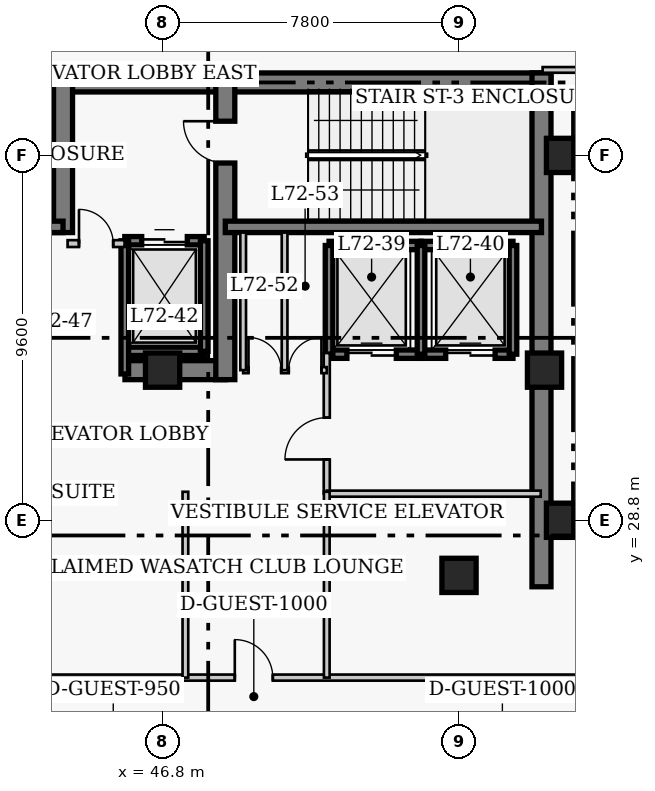
"""IFC4 building model, lengths in metres.
Left out: names, types, materials, properties, quantities, classifications, styles, units other than length and angle.
Written with IfcOpenShell. Run it as: python <this file> out.ifc"""

import sys

from ifc_helpers import new_model, si_unit, direction, frame, frame_2d, origin, origin_2d, place, context, subcontext, project, spatial, rectangle, extrude, element, fill, save


model = new_model("IFC4")
c1 = context("Model", 3, precision=1e-05, world=origin(), true_north=direction((0.0, 1.0)))
c2 = subcontext(c1, "Body", "Model", "MODEL_VIEW")
j1 = project(units=[si_unit("LENGTHUNIT", "METRE"), si_unit("PLANEANGLEUNIT", "RADIAN")], contexts=[c1])
p1 = place(None, origin())
s1 = spatial("IfcSite", under=j1, at=p1, CompositionType="ELEMENT")
p2 = place(p1, origin())
s2 = spatial("IfcBuilding", under=s1, at=p2, CompositionType="ELEMENT")
p3 = place(p2, frame((0.0, 0.0, 289.4)))
s3 = spatial("IfcBuildingStorey", under=s2, at=p3, CompositionType="ELEMENT", Elevation=289.4)
p4 = place(p3, frame((35.85, 40.32, 0.0), z_axis=(0.0, 0.0, 1.0), x_axis=(1.0, 0.0, 0.0)))
e1 = element("IfcWall", 1, at=p4, inside=s3, PredefinedType="SHEAR", context=c2, shape_type="SweptSolid", body=[
    extrude(rectangle(XDim=12.6, YDim=0.5, at=frame_2d((6.3, 0.0))), origin(), (0.0, 0.0, 1.0), 4.0),
])
p5 = place(p3, frame((48.45, 40.32, 0.0), z_axis=(0.0, 0.0, 1.0), x_axis=(1.0, 0.0, 0.0)))
e2 = element("IfcWall", 2, at=p5, inside=s3, PredefinedType="SHEAR", context=c2, shape_type="SweptSolid", body=[
    extrude(rectangle(XDim=8.57, YDim=0.5, at=frame_2d((4.285, 0.0))), origin(), (0.0, 0.0, 1.0), 4.0),
])
p6 = place(p3, frame((56.77, 27.05, 0.0), z_axis=(0.0, 0.0, 1.0), x_axis=(0.0, 1.0, 0.0)))
e3 = element("IfcWall", 3, at=p6, inside=s3, PredefinedType="SHEAR", context=c2, shape_type="SweptSolid", body=[
    extrude(rectangle(XDim=13.52, YDim=0.5, at=frame_2d((6.76, 0.0))), origin(), (0.0, 0.0, 1.0), 4.0),
])
p7 = place(p3, frame((45.81, 32.75, 0.0), z_axis=(0.0, 0.0, 1.0), x_axis=(1.0, 0.0, 0.0)))
e4 = element("IfcWall", 4, at=p7, inside=s3, PredefinedType="SHEAR", context=c2, shape_type="SweptSolid", body=[
    extrude(rectangle(XDim=2.64, YDim=0.5, at=frame_2d((1.32, 0.0))), origin(), (0.0, 0.0, 1.0), 4.0),
])
p8 = place(p3, frame((44.18, 36.37, 0.0), z_axis=(0.0, 0.0, 1.0), x_axis=(0.0, 1.0, 0.0)))
e5 = element("IfcWall", 5, at=p8, inside=s3, PredefinedType="SHEAR", context=c2, shape_type="SweptSolid", body=[
    extrude(rectangle(XDim=3.95, YDim=0.5, at=frame_2d((1.975, 0.0))), origin(), (0.0, 0.0, 1.0), 4.0),
])
p9 = place(p3, frame((48.45, 32.5, 0.0), z_axis=(0.0, 0.0, 1.0), x_axis=(0.0, 1.0, 0.0)))
e6 = element("IfcWall", 6, at=p9, inside=s3, PredefinedType="SHEAR", context=c2, shape_type="SweptSolid", body=[
    extrude(rectangle(XDim=7.82, YDim=0.5, at=frame_2d((3.91, 0.0))), origin(), (0.0, 0.0, 1.0), 4.0),
])
p10 = place(p9, frame((5.7, 0.0, 0.0)))
e7 = element("IfcOpeningElement", 7, at=p10, cuts=e6, PredefinedType="OPENING", context=c2, shape_type="SweptSolid", body=[
    extrude(rectangle(XDim=1.1, YDim=2.15, at=frame_2d((0.55, 1.075))), frame((0.0, 0.26, 0.0), z_axis=(0.0, -1.0, 0.0), x_axis=(1.0, 0.0, 0.0)), (0.0, 0.0, 1.0), 0.52),
])
p11 = place(p3, frame((35.85, 36.52, 0.0), z_axis=(0.0, 0.0, 1.0), x_axis=(1.0, 0.0, 0.0)))
e8 = element("IfcWall", 8, at=p11, inside=s3, PredefinedType="SHEAR", context=c2, shape_type="SweptSolid", body=[
    extrude(rectangle(XDim=8.33, YDim=0.3, at=frame_2d((4.165, 0.0))), origin(), (0.0, 0.0, 1.0), 4.0),
])
p12 = place(p3, frame((48.45, 36.52, 0.0), z_axis=(0.0, 0.0, 1.0), x_axis=(1.0, 0.0, 0.0)))
e9 = element("IfcWall", 9, at=p12, inside=s3, PredefinedType="SHEAR", context=c2, shape_type="SweptSolid", body=[
    extrude(rectangle(XDim=8.32, YDim=0.3, at=frame_2d((4.16, 0.0))), origin(), (0.0, 0.0, 1.0), 4.0),
])
for number, where, z_axis, x_axis in (
    (10, (57.35, 28.8, 0.0), (0.0, 0.0, 1.0), (1.0, 0.0, 0.0)),
    (11, (57.35, 38.4, 0.0), (0.0, 0.0, 1.0), (1.0, 0.0, 0.0)),
    (12, (46.8, 32.75, 0.0), (0.0, 0.0, 1.0), (1.0, 0.0, 0.0)),
    (13, (54.6, 27.35, 0.0), (0.0, 0.0, 1.0), (1.0, 0.0, 0.0)),
    (14, (56.85, 32.75, 0.0), (0.0, 0.0, 1.0), (1.0, 0.0, 0.0)),
):
    element("IfcColumn", number, at=place(p3, frame(where, z_axis=z_axis, x_axis=x_axis)), inside=s3, PredefinedType="COLUMN", context=c2, shape_type="SweptSolid", body=[
        extrude(rectangle(XDim=0.9, YDim=0.9, at=origin_2d()), origin(), (0.0, 0.0, 1.0), 4.0),
    ])
p13 = place(p3, frame((51.18, 36.03, 0.0), z_axis=(0.0, 0.0, 1.0), x_axis=(1.0, 0.0, 0.0)))
e15 = element("IfcWall", 15, at=p13, inside=s3, PredefinedType="SHEAR", context=c2, shape_type="SweptSolid", body=[
    extrude(rectangle(XDim=2.42, YDim=0.22, at=frame_2d((1.21, 0.0))), origin(), (0.0, 0.0, 1.0), 4.0),
])
p14 = place(p3, frame((51.18, 33.17, 0.0), z_axis=(0.0, 0.0, 1.0), x_axis=(1.0, 0.0, 0.0)))
e16 = element("IfcWall", 16, at=p14, inside=s3, PredefinedType="SHEAR", context=c2, shape_type="SweptSolid", body=[
    extrude(rectangle(XDim=2.42, YDim=0.22, at=frame_2d((1.21, 0.0))), origin(), (0.0, 0.0, 1.0), 4.0),
])
p15 = place(p14, frame((0.47, 0.0, 0.0)))
e17 = element("IfcOpeningElement", 17, at=p15, cuts=e16, PredefinedType="OPENING", context=c2, shape_type="SweptSolid", body=[
    extrude(rectangle(XDim=1.3, YDim=2.15, at=frame_2d((0.65, 1.075))), frame((0.0, 0.12, 0.0), z_axis=(0.0, -1.0, 0.0), x_axis=(1.0, 0.0, 0.0)), (0.0, 0.0, 1.0), 0.24),
])
p16 = place(p3, frame((51.18, 33.17, 0.0), z_axis=(0.0, 0.0, 1.0), x_axis=(0.0, 1.0, 0.0)))
e18 = element("IfcWall", 18, at=p16, inside=s3, PredefinedType="SHEAR", context=c2, shape_type="SweptSolid", body=[
    extrude(rectangle(XDim=2.86, YDim=0.2, at=frame_2d((1.43, 0.0))), origin(), (0.0, 0.0, 1.0), 4.0),
])
p17 = place(p3, frame((53.6, 36.03, 0.0), z_axis=(0.0, 0.0, 1.0), x_axis=(1.0, 0.0, 0.0)))
e19 = element("IfcWall", 19, at=p17, inside=s3, PredefinedType="SHEAR", context=c2, shape_type="SweptSolid", body=[
    extrude(rectangle(XDim=2.42, YDim=0.22, at=frame_2d((1.21, 0.0))), origin(), (0.0, 0.0, 1.0), 4.0),
])
p18 = place(p3, frame((53.6, 33.17, 0.0), z_axis=(0.0, 0.0, 1.0), x_axis=(1.0, 0.0, 0.0)))
e20 = element("IfcWall", 20, at=p18, inside=s3, PredefinedType="SHEAR", context=c2, shape_type="SweptSolid", body=[
    extrude(rectangle(XDim=2.42, YDim=0.22, at=frame_2d((1.21, 0.0))), origin(), (0.0, 0.0, 1.0), 4.0),
])
p19 = place(p18, frame((0.65, 0.0, 0.0)))
e21 = element("IfcOpeningElement", 21, at=p19, cuts=e20, PredefinedType="OPENING", context=c2, shape_type="SweptSolid", body=[
    extrude(rectangle(XDim=1.3, YDim=2.15, at=frame_2d((0.65, 1.075))), frame((0.0, 0.12, 0.0), z_axis=(0.0, -1.0, 0.0), x_axis=(1.0, 0.0, 0.0)), (0.0, 0.0, 1.0), 0.24),
])
for number, where, z_axis, x_axis in (
    (22, (53.6, 33.17, 0.0), (0.0, 0.0, 1.0), (0.0, 1.0, 0.0)),
    (23, (56.02, 33.17, 0.0), (0.0, 0.0, 1.0), (0.0, 1.0, 0.0)),
):
    element("IfcWall", number, at=place(p3, frame(where, z_axis=z_axis, x_axis=x_axis)), inside=s3, PredefinedType="SHEAR", context=c2, shape_type="SweptSolid", body=[
        extrude(rectangle(XDim=2.86, YDim=0.2, at=frame_2d((1.43, 0.0))), origin(), (0.0, 0.0, 1.0), 4.0),
    ])
p20 = place(p3, frame((45.805, 36.155, 0.0), z_axis=(0.0, 0.0, 1.0), x_axis=(1.0, 0.0, 0.0)))
e24 = element("IfcWall", 24, at=p20, inside=s3, PredefinedType="SHEAR", context=c2, shape_type="SweptSolid", body=[
    extrude(rectangle(XDim=2.09, YDim=0.22, at=frame_2d((1.045, 0.0))), origin(), (0.0, 0.0, 1.0), 4.0),
])
p21 = place(p20, frame((0.445, 0.0, 0.0)))
e25 = element("IfcOpeningElement", 25, at=p21, cuts=e24, PredefinedType="OPENING", context=c2, shape_type="SweptSolid", body=[
    extrude(rectangle(XDim=1.2, YDim=2.15, at=frame_2d((0.6, 1.075))), frame((0.0, 0.12, 0.0), z_axis=(0.0, -1.0, 0.0), x_axis=(1.0, 0.0, 0.0)), (0.0, 0.0, 1.0), 0.24),
])
p22 = place(p3, frame((45.805, 33.245, 0.0), z_axis=(0.0, 0.0, 1.0), x_axis=(1.0, 0.0, 0.0)))
e26 = element("IfcWall", 26, at=p22, inside=s3, PredefinedType="SHEAR", context=c2, shape_type="SweptSolid", body=[
    extrude(rectangle(XDim=2.09, YDim=0.22, at=frame_2d((1.045, 0.0))), origin(), (0.0, 0.0, 1.0), 4.0),
])
p23 = place(p3, frame((45.805, 32.65, 0.0), z_axis=(0.0, 0.0, 1.0), x_axis=(0.0, 1.0, 0.0)))
e27 = element("IfcWall", 27, at=p23, inside=s3, PredefinedType="SHEAR", context=c2, shape_type="SweptSolid", body=[
    extrude(rectangle(XDim=3.505, YDim=0.2, at=frame_2d((1.752, 0.0))), origin(), (0.0, 0.0, 1.0), 4.0),
])
p24 = place(p3, frame((47.895, 33.245, 0.0), z_axis=(0.0, 0.0, 1.0), x_axis=(0.0, 1.0, 0.0)))
e28 = element("IfcWall", 28, at=p24, inside=s3, PredefinedType="SHEAR", context=c2, shape_type="SweptSolid", body=[
    extrude(rectangle(XDim=2.91, YDim=0.2, at=frame_2d((1.455, 0.0))), origin(), (0.0, 0.0, 1.0), 4.0),
])
p25 = place(p3, frame((44.3, 36.08, 0.0), z_axis=(0.0, 0.0, 1.0), x_axis=(1.0, 0.0, 0.0)))
e29 = element("IfcWall", 29, at=p25, inside=s3, PredefinedType="PARTITIONING", context=c2, shape_type="SweptSolid", body=[
    extrude(rectangle(XDim=1.5, YDim=0.18, at=frame_2d((0.75, 0.0))), origin(), (0.0, 0.0, 1.0), 3.76),
])
p26 = place(p25, frame((0.3, 0.0, 0.0)))
e30 = element("IfcOpeningElement", 30, at=p26, cuts=e29, PredefinedType="OPENING", context=c2, shape_type="SweptSolid", body=[
    extrude(rectangle(XDim=0.9, YDim=2.15, at=frame_2d((0.45, 1.075))), frame((0.0, 0.1, 0.0), z_axis=(0.0, -1.0, 0.0), x_axis=(1.0, 0.0, 0.0)), (0.0, 0.0, 1.0), 0.2),
])
p27 = place(p3, frame((51.12, 29.5, 0.0), z_axis=(0.0, 0.0, 1.0), x_axis=(0.0, 1.0, 0.0)))
e31 = element("IfcWall", 31, at=p27, inside=s3, PredefinedType="PARTITIONING", context=c2, shape_type="SweptSolid", body=[
    extrude(rectangle(XDim=3.7, YDim=0.16, at=frame_2d((1.85, 0.0))), origin(), (0.0, 0.0, 1.0), 3.76),
])
p28 = place(p27, frame((0.9, 0.0, 0.0)))
e32 = element("IfcOpeningElement", 32, at=p28, cuts=e31, PredefinedType="OPENING", context=c2, shape_type="SweptSolid", body=[
    extrude(rectangle(XDim=1.1, YDim=2.15, at=frame_2d((0.55, 1.075))), frame((0.0, 0.09, 0.0), z_axis=(0.0, -1.0, 0.0), x_axis=(1.0, 0.0, 0.0)), (0.0, 0.0, 1.0), 0.18),
])
p29 = place(p3, frame((51.12, 29.5, 0.0), z_axis=(0.0, 0.0, 1.0), x_axis=(1.0, 0.0, 0.0)))
e33 = element("IfcWall", 33, at=p29, inside=s3, PredefinedType="PARTITIONING", context=c2, shape_type="SweptSolid", body=[
    extrude(rectangle(XDim=5.63, YDim=0.16, at=frame_2d((2.815, 0.0))), origin(), (0.0, 0.0, 1.0), 3.76),
])
p30 = place(p3, frame((48.92, 32.75, 0.0), z_axis=(0.0, 0.0, 1.0), x_axis=(1.0, 0.0, 0.0)))
e34 = element("IfcWall", 34, at=p30, inside=s3, PredefinedType="PARTITIONING", context=c2, shape_type="SweptSolid", body=[
    extrude(rectangle(XDim=2.2, YDim=0.16, at=frame_2d((1.1, 0.0))), origin(), (0.0, 0.0, 1.0), 3.76),
])
p31 = place(p30, frame((0.14, 0.0, 0.0)))
e35 = element("IfcOpeningElement", 35, at=p31, cuts=e34, PredefinedType="OPENING", context=c2, shape_type="SweptSolid", body=[
    extrude(rectangle(XDim=0.86, YDim=2.05, at=frame_2d((0.43, 1.025))), frame((0.0, 0.09, 0.0), z_axis=(0.0, -1.0, 0.0), x_axis=(1.0, 0.0, 0.0)), (0.0, 0.0, 1.0), 0.18),
])
p32 = place(p30, frame((1.2, 0.0, 0.0)))
e36 = element("IfcOpeningElement", 36, at=p32, cuts=e34, PredefinedType="OPENING", context=c2, shape_type="SweptSolid", body=[
    extrude(rectangle(XDim=0.86, YDim=2.05, at=frame_2d((0.43, 1.025))), frame((0.0, 0.09, 0.0), z_axis=(0.0, -1.0, 0.0), x_axis=(1.0, 0.0, 0.0)), (0.0, 0.0, 1.0), 0.18),
])
for number, where, z_axis, x_axis in (
    (37, (48.92, 32.75, 0.0), (0.0, 0.0, 1.0), (0.0, 1.0, 0.0)),
    (38, (50.01, 32.75, 0.0), (0.0, 0.0, 1.0), (0.0, 1.0, 0.0)),
):
    element("IfcWall", number, at=place(p3, frame(where, z_axis=z_axis, x_axis=x_axis)), inside=s3, PredefinedType="PARTITIONING", context=c2, shape_type="SweptSolid", body=[
        extrude(rectangle(XDim=3.62, YDim=0.15, at=frame_2d((1.81, 0.0))), origin(), (0.0, 0.0, 1.0), 3.76),
    ])
p33 = place(p3, frame((35.85, 24.66, 0.0), z_axis=(0.0, 0.0, 1.0), x_axis=(1.0, 0.0, 0.0)))
e39 = element("IfcWall", 39, at=p33, inside=s3, PredefinedType="PARTITIONING", context=c2, shape_type="SweptSolid", body=[
    extrude(rectangle(XDim=22.8, YDim=0.16, at=frame_2d((11.4, 0.0))), origin(), (0.0, 0.0, 1.0), 3.76),
])
p34 = place(p33, frame((5.35, 0.0, 0.0)))
e40 = element("IfcOpeningElement", 40, at=p34, cuts=e39, PredefinedType="OPENING", context=c2, shape_type="SweptSolid", body=[
    extrude(rectangle(XDim=1.0, YDim=2.15, at=frame_2d((0.5, 1.075))), frame((0.0, 0.09, 0.0), z_axis=(0.0, -1.0, 0.0), x_axis=(1.0, 0.0, 0.0)), (0.0, 0.0, 1.0), 0.18),
])
p35 = place(p33, frame((12.85, 0.0, 0.0)))
e41 = element("IfcOpeningElement", 41, at=p35, cuts=e39, PredefinedType="OPENING", context=c2, shape_type="SweptSolid", body=[
    extrude(rectangle(XDim=1.0, YDim=2.15, at=frame_2d((0.5, 1.075))), frame((0.0, 0.09, 0.0), z_axis=(0.0, -1.0, 0.0), x_axis=(1.0, 0.0, 0.0)), (0.0, 0.0, 1.0), 0.18),
])
p36 = place(p3, frame((56.8, 40.65, 0.0), z_axis=(0.0, 0.0, 1.0), x_axis=(1.0, 0.0, 0.0)))
e42 = element("IfcWall", 42, at=p36, inside=s3, PredefinedType="PARTITIONING", context=c2, shape_type="SweptSolid", body=[
    extrude(rectangle(XDim=4.01, YDim=0.15, at=frame_2d((2.005, 0.0))), origin(), (0.0, 0.0, 1.0), 3.76),
])
p37 = place(p36, frame((2.4, 0.0, 0.0)))
e43 = element("IfcOpeningElement", 43, at=p37, cuts=e42, PredefinedType="OPENING", context=c2, shape_type="SweptSolid", body=[
    extrude(rectangle(XDim=1.0, YDim=2.15, at=frame_2d((0.5, 1.075))), frame((0.0, 0.085, 0.0), z_axis=(0.0, -1.0, 0.0), x_axis=(1.0, 0.0, 0.0)), (0.0, 0.0, 1.0), 0.17),
])
for number, where, z_axis, x_axis in (
    (44, (47.4, 24.66, 0.0), (0.0, 0.0, 1.0), (0.0, 1.0, 0.0)),
    (45, (51.12, 24.66, 0.0), (0.0, 0.0, 1.0), (0.0, 1.0, 0.0)),
):
    element("IfcWall", number, at=place(p3, frame(where, z_axis=z_axis, x_axis=x_axis)), inside=s3, PredefinedType="PARTITIONING", context=c2, shape_type="SweptSolid", body=[
        extrude(rectangle(XDim=4.89, YDim=0.15, at=frame_2d((2.445, 0.0))), origin(), (0.0, 0.0, 1.0), 3.76),
    ])
p38 = place(p15, origin())
e46 = element("IfcDoor", 46, at=p38, inside=s3, OperationType="DOUBLE_DOOR_SLIDING", PredefinedType="DOOR", context=c2, shape_type="SweptSolid", body=[
    extrude(rectangle(XDim=1.3, YDim=2.15, at=frame_2d((0.65, 1.075))), frame((0.0, 0.025, 0.0), z_axis=(0.0, -1.0, 0.0), x_axis=(1.0, 0.0, 0.0)), (0.0, 0.0, 1.0), 0.05),
])
fill(e17, e46)
p39 = place(p19, origin())
e47 = element("IfcDoor", 47, at=p39, inside=s3, OperationType="DOUBLE_DOOR_SLIDING", PredefinedType="DOOR", context=c2, shape_type="SweptSolid", body=[
    extrude(rectangle(XDim=1.3, YDim=2.15, at=frame_2d((0.65, 1.075))), frame((0.0, 0.025, 0.0), z_axis=(0.0, -1.0, 0.0), x_axis=(1.0, 0.0, 0.0)), (0.0, 0.0, 1.0), 0.05),
])
fill(e21, e47)
p40 = place(p21, origin())
e48 = element("IfcDoor", 48, at=p40, inside=s3, OperationType="DOUBLE_DOOR_SLIDING", PredefinedType="DOOR", context=c2, shape_type="SweptSolid", body=[
    extrude(rectangle(XDim=1.2, YDim=2.15, at=frame_2d((0.6, 1.075))), frame((0.0, 0.025, 0.0), z_axis=(0.0, -1.0, 0.0), x_axis=(1.0, 0.0, 0.0)), (0.0, 0.0, 1.0), 0.05),
])
fill(e25, e48)
p41 = place(p26, origin())
e49 = element("IfcDoor", 49, at=p41, inside=s3, OperationType="SINGLE_SWING_LEFT", PredefinedType="DOOR", context=c2, shape_type="SweptSolid", body=[
    extrude(rectangle(XDim=0.9, YDim=2.15, at=frame_2d((0.45, 1.075))), frame((0.0, 0.025, 0.0), z_axis=(0.0, -1.0, 0.0), x_axis=(1.0, 0.0, 0.0)), (0.0, 0.0, 1.0), 0.05),
])
fill(e30, e49)
p42 = place(p28, origin())
e50 = element("IfcDoor", 50, at=p42, inside=s3, OperationType="SINGLE_SWING_LEFT", PredefinedType="DOOR", context=c2, shape_type="SweptSolid", body=[
    extrude(rectangle(XDim=1.1, YDim=2.15, at=frame_2d((0.55, 1.075))), frame((0.0, 0.025, 0.0), z_axis=(0.0, -1.0, 0.0), x_axis=(1.0, 0.0, 0.0)), (0.0, 0.0, 1.0), 0.05),
])
fill(e32, e50)
p43 = place(p31, origin())
e51 = element("IfcDoor", 51, at=p43, inside=s3, OperationType="SINGLE_SWING_LEFT", PredefinedType="DOOR", context=c2, shape_type="SweptSolid", body=[
    extrude(rectangle(XDim=0.86, YDim=2.05, at=frame_2d((0.43, 1.025))), frame((0.0, 0.025, 0.0), z_axis=(0.0, -1.0, 0.0), x_axis=(1.0, 0.0, 0.0)), (0.0, 0.0, 1.0), 0.05),
])
fill(e35, e51)
p44 = place(p32, origin())
e52 = element("IfcDoor", 52, at=p44, inside=s3, OperationType="SINGLE_SWING_RIGHT", PredefinedType="DOOR", context=c2, shape_type="SweptSolid", body=[
    extrude(rectangle(XDim=0.86, YDim=2.05, at=frame_2d((0.43, 1.025))), frame((0.0, 0.025, 0.0), z_axis=(0.0, -1.0, 0.0), x_axis=(1.0, 0.0, 0.0)), (0.0, 0.0, 1.0), 0.05),
])
fill(e36, e52)
p45 = place(p35, origin())
e53 = element("IfcDoor", 53, at=p45, inside=s3, OperationType="SINGLE_SWING_LEFT", PredefinedType="DOOR", context=c2, shape_type="SweptSolid", body=[
    extrude(rectangle(XDim=1.0, YDim=2.15, at=frame_2d((0.5, 1.075))), frame((0.0, 0.025, 0.0), z_axis=(0.0, -1.0, 0.0), x_axis=(1.0, 0.0, 0.0)), (0.0, 0.0, 1.0), 0.05),
])
fill(e41, e53)
p46 = place(p10, origin())
e54 = element("IfcDoor", 54, at=p46, inside=s3, OperationType="SINGLE_SWING_RIGHT", PredefinedType="DOOR", context=c2, shape_type="SweptSolid", body=[
    extrude(rectangle(XDim=1.1, YDim=2.15, at=frame_2d((0.55, 1.075))), frame((0.0, 0.025, 0.0), z_axis=(0.0, -1.0, 0.0), x_axis=(1.0, 0.0, 0.0)), (0.0, 0.0, 1.0), 0.05),
])
fill(e7, e54)
save(model, sys.argv[1])
